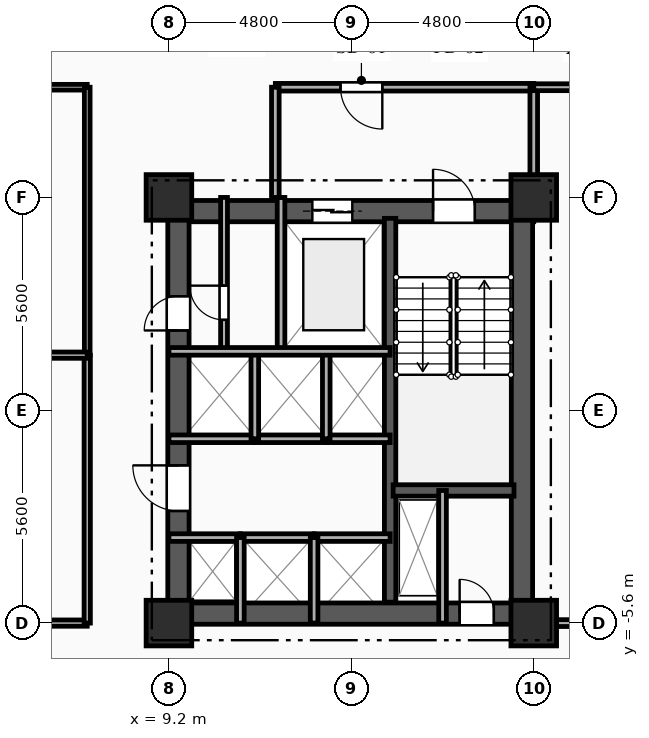
"""IFC4 building model, lengths in metres.
Left out: names, types, materials, properties, quantities, classifications, styles, units other than length and angle.
Written with IfcOpenShell. Run it as: python <this file> out.ifc"""

import sys

from ifc_helpers import new_model, si_unit, direction, frame, frame_2d, origin, origin_2d, place, context, subcontext, project, spatial, rectangle, extrude, element, fill, save


model = new_model("IFC4")
c1 = context("Model", 3, precision=1e-05, world=origin(), true_north=direction((0.0, 1.0)))
c2 = subcontext(c1, "Body", "Model", "MODEL_VIEW")
j1 = project(units=[si_unit("LENGTHUNIT", "METRE"), si_unit("PLANEANGLEUNIT", "RADIAN")], contexts=[c1])
p1 = place(None, origin())
s1 = spatial("IfcSite", under=j1, at=p1, CompositionType="ELEMENT")
p2 = place(p1, origin())
s2 = spatial("IfcBuilding", under=s1, at=p2, CompositionType="ELEMENT")
p3 = place(p2, frame((0.0, 0.0, 57.15)))
s3 = spatial("IfcBuildingStorey", under=s2, at=p3, CompositionType="ELEMENT", Elevation=57.15)
for number, where, z_axis, x_axis in (
    (1, (9.2, -5.6, 0.0), (0.0, 0.0, 1.0), (1.0, 0.0, 0.0)),
    (2, (9.2, 5.6, 0.0), (0.0, 0.0, 1.0), (1.0, 0.0, 0.0)),
    (3, (18.8, -5.6, 0.0), (0.0, 0.0, 1.0), (1.0, 0.0, 0.0)),
    (4, (18.8, 5.6, 0.0), (0.0, 0.0, 1.0), (1.0, 0.0, 0.0)),
):
    element("IfcColumn", number, at=place(p3, frame(where, z_axis=z_axis, x_axis=x_axis)), inside=s3, PredefinedType="COLUMN", context=c2, shape_type="SweptSolid", body=[
        extrude(rectangle(XDim=1.2, YDim=1.2, at=origin_2d()), origin(), (0.0, 0.0, 1.0), 3.35),
    ])
p4 = place(p3, frame((9.2, 5.24, 0.0), z_axis=(0.0, 0.0, 1.0), x_axis=(1.0, 0.0, 0.0)))
e5 = element("IfcWall", 5, at=p4, inside=s3, PredefinedType="SHEAR", context=c2, shape_type="SweptSolid", body=[
    extrude(rectangle(XDim=9.6, YDim=0.56, at=frame_2d((4.8, 0.0))), origin(), (0.0, 0.0, 1.0), 3.035),
])
p5 = place(p4, frame((6.95, 0.0, 0.0)))
e6 = element("IfcOpeningElement", 6, at=p5, cuts=e5, PredefinedType="OPENING", context=c2, shape_type="SweptSolid", body=[
    extrude(rectangle(XDim=1.1, YDim=2.15, at=frame_2d((0.55, 1.075))), frame((0.0, 0.29, 0.0), z_axis=(0.0, -1.0, 0.0), x_axis=(1.0, 0.0, 0.0)), (0.0, 0.0, 1.0), 0.58),
])
p6 = place(p4, frame((3.775, 0.0, 0.0)))
e7 = element("IfcOpeningElement", 7, at=p6, cuts=e5, PredefinedType="OPENING", context=c2, shape_type="SweptSolid", body=[
    extrude(rectangle(XDim=1.05, YDim=2.1, at=frame_2d((0.525, 1.05))), frame((0.0, 0.29, 0.0), z_axis=(0.0, -1.0, 0.0), x_axis=(1.0, 0.0, 0.0)), (0.0, 0.0, 1.0), 0.58),
])
p7 = place(p3, frame((9.2, -5.35, 0.0), z_axis=(0.0, 0.0, 1.0), x_axis=(1.0, 0.0, 0.0)))
e8 = element("IfcWall", 8, at=p7, inside=s3, PredefinedType="SHEAR", context=c2, shape_type="SweptSolid", body=[
    extrude(rectangle(XDim=9.6, YDim=0.56, at=frame_2d((4.8, 0.0))), origin(), (0.0, 0.0, 1.0), 3.035),
])
p8 = place(p7, frame((7.65, 0.0, 0.0)))
e9 = element("IfcOpeningElement", 9, at=p8, cuts=e8, PredefinedType="OPENING", context=c2, shape_type="SweptSolid", body=[
    extrude(rectangle(XDim=0.9, YDim=2.1, at=frame_2d((0.45, 1.05))), frame((0.0, 0.29, 0.0), z_axis=(0.0, -1.0, 0.0), x_axis=(1.0, 0.0, 0.0)), (0.0, 0.0, 1.0), 0.58),
])
p9 = place(p3, frame((9.45, -5.05, 0.0), z_axis=(0.0, 0.0, 1.0), x_axis=(0.0, 1.0, 0.0)))
e10 = element("IfcWall", 10, at=p9, inside=s3, PredefinedType="SHEAR", context=c2, shape_type="SweptSolid", body=[
    extrude(rectangle(XDim=10.1, YDim=0.56, at=frame_2d((5.05, 0.0))), origin(), (0.0, 0.0, 1.0), 3.035),
])
p10 = place(p9, frame((7.15, 0.0, 0.0)))
e11 = element("IfcOpeningElement", 11, at=p10, cuts=e10, PredefinedType="OPENING", context=c2, shape_type="SweptSolid", body=[
    extrude(rectangle(XDim=0.9, YDim=2.1, at=frame_2d((0.45, 1.05))), frame((0.0, 0.29, 0.0), z_axis=(0.0, -1.0, 0.0), x_axis=(1.0, 0.0, 0.0)), (0.0, 0.0, 1.0), 0.58),
])
p11 = place(p9, frame((2.4, 0.0, 0.0)))
e12 = element("IfcOpeningElement", 12, at=p11, cuts=e10, PredefinedType="OPENING", context=c2, shape_type="SweptSolid", body=[
    extrude(rectangle(XDim=1.2, YDim=2.15, at=frame_2d((0.6, 1.075))), frame((0.0, 0.29, 0.0), z_axis=(0.0, -1.0, 0.0), x_axis=(1.0, 0.0, 0.0)), (0.0, 0.0, 1.0), 0.58),
])
p12 = place(p3, frame((18.49, -5.05, 0.0), z_axis=(0.0, 0.0, 1.0), x_axis=(0.0, 1.0, 0.0)))
e13 = element("IfcWall", 13, at=p12, inside=s3, PredefinedType="SHEAR", context=c2, shape_type="SweptSolid", body=[
    extrude(rectangle(XDim=10.1, YDim=0.56, at=frame_2d((5.05, 0.0))), origin(), (0.0, 0.0, 1.0), 3.035),
])
p13 = place(p3, frame((15.02, -5.05, 0.0), z_axis=(0.0, 0.0, 1.0), x_axis=(0.0, 1.0, 0.0)))
e14 = element("IfcWall", 14, at=p13, inside=s3, PredefinedType="SHEAR", context=c2, shape_type="SweptSolid", body=[
    extrude(rectangle(XDim=10.1, YDim=0.3, at=frame_2d((5.05, 0.0))), origin(), (0.0, 0.0, 1.0), 3.035),
])
p14 = place(p3, frame((15.1, -2.11, 0.0), z_axis=(0.0, 0.0, 1.0), x_axis=(1.0, 0.0, 0.0)))
e15 = element("IfcWall", 15, at=p14, inside=s3, PredefinedType="SHEAR", context=c2, shape_type="SweptSolid", body=[
    extrude(rectangle(XDim=3.18, YDim=0.3, at=frame_2d((1.59, 0.0))), origin(), (0.0, 0.0, 1.0), 3.035),
])
p15 = place(p3, frame((16.4, -2.11, 0.0), z_axis=(0.0, 0.0, 1.0), x_axis=(0.0, -1.0, 0.0)))
e16 = element("IfcWall", 16, at=p15, inside=s3, PredefinedType="PARTITIONING", context=c2, shape_type="SweptSolid", body=[
    extrude(rectangle(XDim=3.49, YDim=0.2, at=frame_2d((1.745, 0.0))), origin(), (0.0, 0.0, 1.0), 3.035),
])
p16 = place(p3, frame((12.15, 5.6, 0.0), z_axis=(0.0, 0.0, 1.0), x_axis=(0.0, -1.0, 0.0)))
e17 = element("IfcWall", 17, at=p16, inside=s3, PredefinedType="PARTITIONING", context=c2, shape_type="SweptSolid", body=[
    extrude(rectangle(XDim=4.05, YDim=0.2, at=frame_2d((2.025, 0.0))), origin(), (0.0, 0.0, 1.0), 3.035),
])
p17 = place(p3, frame((18.8, 8.5, 0.0), z_axis=(0.0, 0.0, 1.0), x_axis=(-1.0, 0.0, 0.0)))
e18 = element("IfcWall", 18, at=p17, inside=s3, PredefinedType="PARTITIONING", context=c2, shape_type="SweptSolid", body=[
    extrude(rectangle(XDim=6.8, YDim=0.2, at=frame_2d((3.4, 0.0))), origin(), (0.0, 0.0, 1.0), 3.035),
])
p18 = place(p17, frame((3.985, 0.0, 0.0)))
e19 = element("IfcOpeningElement", 19, at=p18, cuts=e18, PredefinedType="OPENING", context=c2, shape_type="SweptSolid", body=[
    extrude(rectangle(XDim=1.1, YDim=2.15, at=frame_2d((0.55, 1.075))), frame((0.0, 0.11, 0.0), z_axis=(0.0, -1.0, 0.0), x_axis=(1.0, 0.0, 0.0)), (0.0, 0.0, 1.0), 0.22),
])
p19 = place(p3, frame((12.0, 8.5, 0.0), z_axis=(0.0, 0.0, 1.0), x_axis=(0.0, -1.0, 0.0)))
e20 = element("IfcWall", 20, at=p19, inside=s3, PredefinedType="PARTITIONING", context=c2, shape_type="SweptSolid", body=[
    extrude(rectangle(XDim=2.9, YDim=0.2, at=frame_2d((1.45, 0.0))), origin(), (0.0, 0.0, 1.0), 3.035),
])
p20 = place(p3, frame((18.8, 5.6, 0.0), z_axis=(0.0, 0.0, 1.0), x_axis=(0.0, 1.0, 0.0)))
e21 = element("IfcWall", 21, at=p20, inside=s3, PredefinedType="PARTITIONING", context=c2, shape_type="SweptSolid", body=[
    extrude(rectangle(XDim=2.9, YDim=0.2, at=frame_2d((1.45, 0.0))), origin(), (0.0, 0.0, 1.0), 2.52),
])
p21 = place(p3, frame((10.65, 1.55, 0.0), z_axis=(0.0, 0.0, 1.0), x_axis=(0.0, 1.0, 0.0)))
e22 = element("IfcWall", 22, at=p21, inside=s3, PredefinedType="PARTITIONING", context=c2, shape_type="SweptSolid", body=[
    extrude(rectangle(XDim=4.05, YDim=0.18, at=frame_2d((2.025, 0.0))), origin(), (0.0, 0.0, 1.0), 3.035),
])
p22 = place(p21, frame((0.829, 0.0, 0.0)))
e23 = element("IfcOpeningElement", 23, at=p22, cuts=e22, PredefinedType="OPENING", context=c2, shape_type="SweptSolid", body=[
    extrude(rectangle(XDim=0.9, YDim=2.1, at=frame_2d((0.45, 1.05))), frame((0.0, 0.1, 0.0), z_axis=(0.0, -1.0, 0.0), x_axis=(1.0, 0.0, 0.0)), (0.0, 0.0, 1.0), 0.2),
])
p23 = place(p3, frame((9.2, -3.35, 0.0), z_axis=(0.0, 0.0, 1.0), x_axis=(1.0, 0.0, 0.0)))
e24 = element("IfcWall", 24, at=p23, inside=s3, PredefinedType="PARTITIONING", context=c2, shape_type="SweptSolid", body=[
    extrude(rectangle(XDim=1.88, YDim=0.2, at=frame_2d((0.94, 0.0))), origin(), (0.0, 0.0, 1.0), 2.75),
])
p24 = place(p3, frame((11.08, -3.35, 0.0), z_axis=(0.0, 0.0, 1.0), x_axis=(1.0, 0.0, 0.0)))
e25 = element("IfcWall", 25, at=p24, inside=s3, PredefinedType="PARTITIONING", context=c2, shape_type="SweptSolid", body=[
    extrude(rectangle(XDim=1.94, YDim=0.2, at=frame_2d((0.97, 0.0))), origin(), (0.0, 0.0, 1.0), 3.035),
])
p25 = place(p3, frame((13.02, -3.35, 0.0), z_axis=(0.0, 0.0, 1.0), x_axis=(1.0, 0.0, 0.0)))
e26 = element("IfcWall", 26, at=p25, inside=s3, PredefinedType="PARTITIONING", context=c2, shape_type="SweptSolid", body=[
    extrude(rectangle(XDim=2.0, YDim=0.2, at=frame_2d((1.0, 0.0))), origin(), (0.0, 0.0, 1.0), 3.035),
])
p26 = place(p3, frame((11.46, -0.75, 0.0), z_axis=(0.0, 0.0, 1.0), x_axis=(-1.0, 0.0, 0.0)))
e27 = element("IfcWall", 27, at=p26, inside=s3, PredefinedType="PARTITIONING", context=c2, shape_type="SweptSolid", body=[
    extrude(rectangle(XDim=2.26, YDim=0.2, at=frame_2d((1.13, 0.0))), origin(), (0.0, 0.0, 1.0), 3.035),
])
p27 = place(p3, frame((13.34, -0.75, 0.0), z_axis=(0.0, 0.0, 1.0), x_axis=(-1.0, 0.0, 0.0)))
e28 = element("IfcWall", 28, at=p27, inside=s3, PredefinedType="PARTITIONING", context=c2, shape_type="SweptSolid", body=[
    extrude(rectangle(XDim=1.88, YDim=0.2, at=frame_2d((0.94, 0.0))), origin(), (0.0, 0.0, 1.0), 3.035),
])
p28 = place(p3, frame((15.02, -0.75, 0.0), z_axis=(0.0, 0.0, 1.0), x_axis=(-1.0, 0.0, 0.0)))
e29 = element("IfcWall", 29, at=p28, inside=s3, PredefinedType="PARTITIONING", context=c2, shape_type="SweptSolid", body=[
    extrude(rectangle(XDim=1.68, YDim=0.2, at=frame_2d((0.84, 0.0))), origin(), (0.0, 0.0, 1.0), 3.035),
])
for number, where, z_axis, x_axis in (
    (30, (11.08, -5.6, 0.0), (0.0, 0.0, 1.0), (0.0, 1.0, 0.0)),
    (31, (13.02, -5.6, 0.0), (0.0, 0.0, 1.0), (0.0, 1.0, 0.0)),
):
    element("IfcWall", number, at=place(p3, frame(where, z_axis=z_axis, x_axis=x_axis)), inside=s3, PredefinedType="PARTITIONING", context=c2, shape_type="SweptSolid", body=[
        extrude(rectangle(XDim=2.25, YDim=0.2, at=frame_2d((1.125, 0.0))), origin(), (0.0, 0.0, 1.0), 3.035),
    ])
for number, where, z_axis, x_axis in (
    (32, (11.46, -0.75, 0.0), (0.0, 0.0, 1.0), (0.0, 1.0, 0.0)),
    (33, (13.34, -0.75, 0.0), (0.0, 0.0, 1.0), (0.0, 1.0, 0.0)),
):
    element("IfcWall", number, at=place(p3, frame(where, z_axis=z_axis, x_axis=x_axis)), inside=s3, PredefinedType="PARTITIONING", context=c2, shape_type="SweptSolid", body=[
        extrude(rectangle(XDim=2.3, YDim=0.2, at=frame_2d((1.15, 0.0))), origin(), (0.0, 0.0, 1.0), 3.035),
    ])
p29 = place(p3, frame((21.45, 8.5, 0.0), z_axis=(0.0, 0.0, 1.0), x_axis=(-1.0, 0.0, 0.0)))
e34 = element("IfcWall", 34, at=p29, inside=s3, PredefinedType="PARTITIONING", context=c2, shape_type="SweptSolid", body=[
    extrude(rectangle(XDim=2.65, YDim=0.18, at=frame_2d((1.325, 0.0))), origin(), (0.0, 0.0, 1.0), 3.035),
])
p30 = place(p29, frame((0.641, 0.0, 0.0)))
e35 = element("IfcOpeningElement", 35, at=p30, cuts=e34, PredefinedType="OPENING", context=c2, shape_type="SweptSolid", body=[
    extrude(rectangle(XDim=1.0, YDim=2.15, at=frame_2d((0.5, 1.075))), frame((0.0, 0.1, 0.0), z_axis=(0.0, -1.0, 0.0), x_axis=(1.0, 0.0, 0.0)), (0.0, 0.0, 1.0), 0.2),
])
p31 = place(p3, frame((7.05, 8.5, 0.0), z_axis=(0.0, 0.0, 1.0), x_axis=(-1.0, 0.0, 0.0)))
e36 = element("IfcWall", 36, at=p31, inside=s3, PredefinedType="PARTITIONING", context=c2, shape_type="SweptSolid", body=[
    extrude(rectangle(XDim=7.05, YDim=0.15, at=frame_2d((3.525, 0.0))), origin(), (0.0, 0.0, 1.0), 3.035),
])
p32 = place(p3, frame((18.8, -5.6, 0.0), z_axis=(0.0, 0.0, 1.0), x_axis=(1.0, 0.0, 0.0)))
e37 = element("IfcWall", 37, at=p32, inside=s3, PredefinedType="PARTITIONING", context=c2, shape_type="SweptSolid", body=[
    extrude(rectangle(XDim=2.65, YDim=0.18, at=frame_2d((1.325, 0.0))), origin(), (0.0, 0.0, 1.0), 3.035),
])
p33 = place(p3, frame((0.0, -5.6, 0.0), z_axis=(0.0, 0.0, 1.0), x_axis=(1.0, 0.0, 0.0)))
e38 = element("IfcWall", 38, at=p33, inside=s3, PredefinedType="PARTITIONING", context=c2, shape_type="SweptSolid", body=[
    extrude(rectangle(XDim=7.05, YDim=0.165, at=frame_2d((3.525, 0.0))), origin(), (0.0, 0.0, 1.0), 2.52),
])
p34 = place(p3, frame((7.05, -5.6, 0.0), z_axis=(0.0, 0.0, 1.0), x_axis=(0.0, 1.0, 0.0)))
e39 = element("IfcWall", 39, at=p34, inside=s3, PredefinedType="PARTITIONING", context=c2, shape_type="SweptSolid", body=[
    extrude(rectangle(XDim=7.05, YDim=0.165, at=frame_2d((3.525, 0.0))), origin(), (0.0, 0.0, 1.0), 3.035),
])
p35 = place(p3, frame((7.05, 1.45, 0.0), z_axis=(0.0, 0.0, 1.0), x_axis=(0.0, 1.0, 0.0)))
e40 = element("IfcWall", 40, at=p35, inside=s3, PredefinedType="PARTITIONING", context=c2, shape_type="SweptSolid", body=[
    extrude(rectangle(XDim=7.05, YDim=0.15, at=frame_2d((3.525, 0.0))), origin(), (0.0, 0.0, 1.0), 3.035),
])
p36 = place(p3, frame((-7.05, 1.45, 0.0), z_axis=(0.0, 0.0, 1.0), x_axis=(1.0, 0.0, 0.0)))
e41 = element("IfcWall", 41, at=p36, inside=s3, PredefinedType="PARTITIONING", context=c2, shape_type="SweptSolid", body=[
    extrude(rectangle(XDim=14.1, YDim=0.165, at=frame_2d((7.05, 0.0))), origin(), (0.0, 0.0, 1.0), 3.035),
])
p37 = place(p3, frame((9.2, 1.55, 0.0), z_axis=(0.0, 0.0, 1.0), x_axis=(1.0, 0.0, 0.0)))
e42 = element("IfcWall", 42, at=p37, inside=s3, PredefinedType="PARTITIONING", context=c2, shape_type="SweptSolid", body=[
    extrude(rectangle(XDim=5.82, YDim=0.2, at=frame_2d((2.91, 0.0))), origin(), (0.0, 0.0, 1.0), 3.035),
])
p38 = place(p5, origin())
e43 = element("IfcDoor", 43, at=p38, inside=s3, OperationType="SINGLE_SWING_LEFT", PredefinedType="DOOR", context=c2, shape_type="SweptSolid", body=[
    extrude(rectangle(XDim=1.1, YDim=2.15, at=frame_2d((0.55, 1.075))), frame((0.0, 0.025, 0.0), z_axis=(0.0, -1.0, 0.0), x_axis=(1.0, 0.0, 0.0)), (0.0, 0.0, 1.0), 0.05),
])
fill(e6, e43)
p39 = place(p6, origin())
e44 = element("IfcDoor", 44, at=p39, inside=s3, OperationType="DOUBLE_DOOR_SLIDING", PredefinedType="DOOR", context=c2, shape_type="SweptSolid", body=[
    extrude(rectangle(XDim=1.05, YDim=2.1, at=frame_2d((0.525, 1.05))), frame((0.0, 0.025, 0.0), z_axis=(0.0, -1.0, 0.0), x_axis=(1.0, 0.0, 0.0)), (0.0, 0.0, 1.0), 0.05),
])
fill(e7, e44)
p40 = place(p8, origin())
e45 = element("IfcDoor", 45, at=p40, inside=s3, OperationType="SINGLE_SWING_LEFT", PredefinedType="DOOR", context=c2, shape_type="SweptSolid", body=[
    extrude(rectangle(XDim=0.9, YDim=2.1, at=frame_2d((0.45, 1.05))), frame((0.0, 0.025, 0.0), z_axis=(0.0, -1.0, 0.0), x_axis=(1.0, 0.0, 0.0)), (0.0, 0.0, 1.0), 0.05),
])
fill(e9, e45)
p41 = place(p18, origin())
e46 = element("IfcDoor", 46, at=p41, inside=s3, OperationType="SINGLE_SWING_LEFT", PredefinedType="DOOR", context=c2, shape_type="SweptSolid", body=[
    extrude(rectangle(XDim=1.1, YDim=2.15, at=frame_2d((0.55, 1.075))), frame((0.0, 0.025, 0.0), z_axis=(0.0, -1.0, 0.0), x_axis=(1.0, 0.0, 0.0)), (0.0, 0.0, 1.0), 0.05),
])
fill(e19, e46)
p42 = place(p22, origin())
e47 = element("IfcDoor", 47, at=p42, inside=s3, OperationType="SINGLE_SWING_RIGHT", PredefinedType="DOOR", context=c2, shape_type="SweptSolid", body=[
    extrude(rectangle(XDim=0.9, YDim=2.1, at=frame_2d((0.45, 1.05))), frame((0.0, 0.025, 0.0), z_axis=(0.0, -1.0, 0.0), x_axis=(1.0, 0.0, 0.0)), (0.0, 0.0, 1.0), 0.05),
])
fill(e23, e47)
p43 = place(p10, origin())
e48 = element("IfcDoor", 48, at=p43, inside=s3, OperationType="SINGLE_SWING_LEFT", PredefinedType="DOOR", context=c2, shape_type="SweptSolid", body=[
    extrude(rectangle(XDim=0.9, YDim=2.1, at=frame_2d((0.45, 1.05))), frame((0.0, 0.025, 0.0), z_axis=(0.0, -1.0, 0.0), x_axis=(1.0, 0.0, 0.0)), (0.0, 0.0, 1.0), 0.05),
])
fill(e11, e48)
p44 = place(p11, origin())
e49 = element("IfcDoor", 49, at=p44, inside=s3, OperationType="SINGLE_SWING_RIGHT", PredefinedType="DOOR", context=c2, shape_type="SweptSolid", body=[
    extrude(rectangle(XDim=1.2, YDim=2.15, at=frame_2d((0.6, 1.075))), frame((0.0, 0.025, 0.0), z_axis=(0.0, -1.0, 0.0), x_axis=(1.0, 0.0, 0.0)), (0.0, 0.0, 1.0), 0.05),
])
fill(e12, e49)
save(model, sys.argv[1])
